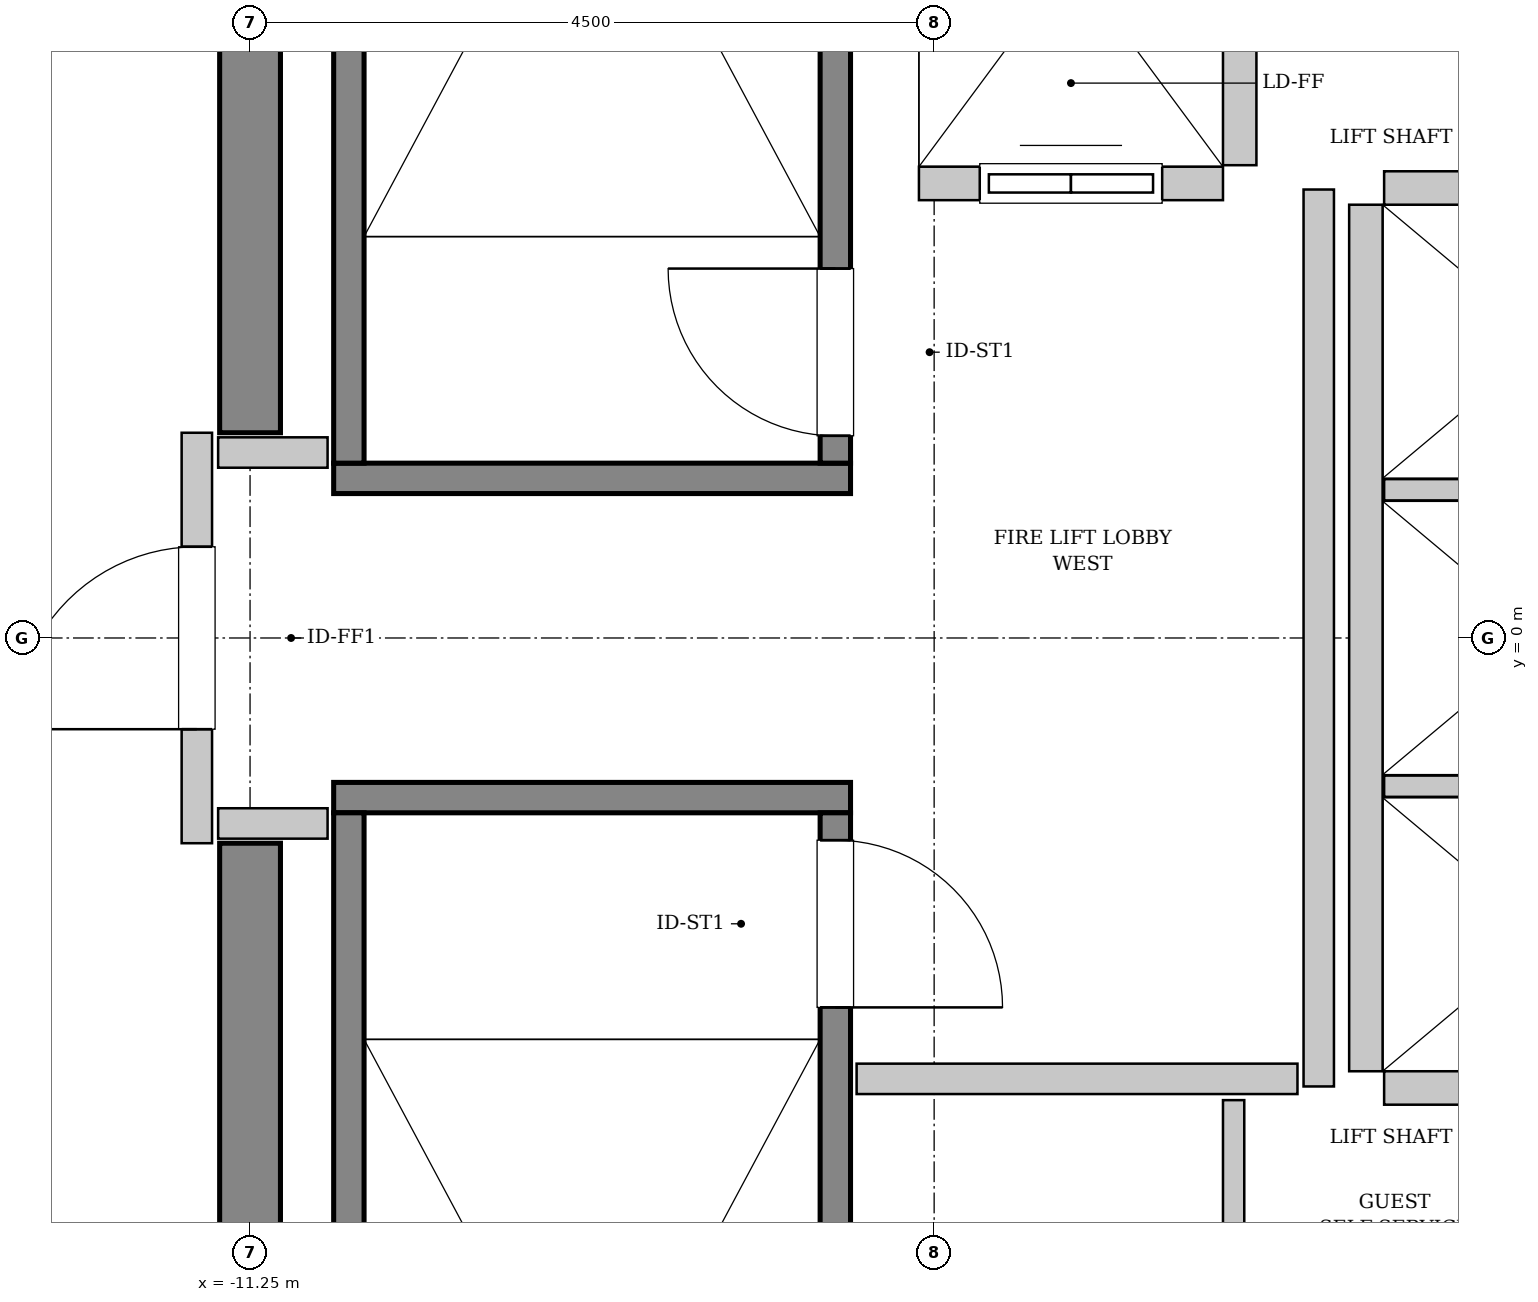
"""IFC4 building model, lengths in metres.
Left out: names, types, materials, properties, quantities, classifications, styles, units other than length and angle.
Written with IfcOpenShell. Run it as: python <this file> out.ifc"""

import sys

from ifc_helpers import new_model, si_unit, direction, frame, frame_2d, origin, place, context, subcontext, project, spatial, rectangle, extrude, source, transform, mapped, element, fill, save


model = new_model("IFC4")
c1 = context("Model", 3, precision=1e-05, world=origin(), true_north=direction((0.0, 1.0)))
c2 = subcontext(c1, "Body", "Model", "MODEL_VIEW")
j1 = project(units=[si_unit("LENGTHUNIT", "METRE"), si_unit("PLANEANGLEUNIT", "RADIAN")], contexts=[c1])
p1 = place(None, origin())
s1 = spatial("IfcSite", under=j1, at=p1, CompositionType="ELEMENT")
p2 = place(p1, origin())
s2 = spatial("IfcBuilding", under=s1, at=p2, CompositionType="ELEMENT")
p3 = place(p2, frame((0.0, 0.0, 349.0)))
s3 = spatial("IfcBuildingStorey", under=s2, at=p3, CompositionType="ELEMENT", Elevation=349.0)
m1 = source(origin(), c2, "Body", "SweptSolid", [
    extrude(rectangle(XDim=7.45, YDim=0.4, at=frame_2d((3.725, 0.0))), origin(), (0.0, 0.0, 1.0), 4.8),
])
for number, where, z_axis, x_axis in (
    (1, (-11.25, -8.8, 0.0), (0.0, 0.0, 1.0), (0.0, 1.0, 0.0)),
    (2, (-11.25, 1.35, 0.0), (0.0, 0.0, 1.0), (0.0, 1.0, 0.0)),
):
    element("IfcWall", number, at=place(p3, frame(where, z_axis=z_axis, x_axis=x_axis)), inside=s3, PredefinedType="SHEAR", context=c2, shape_type="MappedRepresentation", body=[
        mapped(m1, transform((0.0, 0.0, 0.0), x_axis=(1.0, 0.0, 0.0), y_axis=(0.0, 1.0, 0.0), z_axis=(0.0, 0.0, 1.0), scale=1.0)),
    ])
m2 = source(origin(), c2, "Body", "SweptSolid", [
    extrude(rectangle(XDim=3.4, YDim=0.2, at=frame_2d((1.7, 0.0))), origin(), (0.0, 0.0, 1.0), 4.8),
])
p4 = place(p3, frame((-7.3, 1.05, 0.0), z_axis=(0.0, 0.0, 1.0), x_axis=(-1.0, 0.0, 0.0)))
e3 = element("IfcWall", 3, at=p4, inside=s3, PredefinedType="SOLIDWALL", context=c2, shape_type="MappedRepresentation", body=[
    mapped(m2, transform((0.0, 0.0, 0.0), x_axis=(1.0, 0.0, 0.0), y_axis=(0.0, 1.0, 0.0), z_axis=(0.0, 0.0, 1.0), scale=1.0)),
])
m3 = source(origin(), c2, "Body", "SweptSolid", [
    extrude(rectangle(XDim=7.1, YDim=0.2, at=frame_2d((3.55, 0.0))), origin(), (0.0, 0.0, 1.0), 4.8),
])
p5 = place(p3, frame((-7.4, 1.15, 0.0), z_axis=(0.0, 0.0, 1.0), x_axis=(0.0, 1.0, 0.0)))
e4 = element("IfcWall", 4, at=p5, inside=s3, PredefinedType="SOLIDWALL", context=c2, shape_type="MappedRepresentation", body=[
    mapped(m3, transform((0.0, 0.0, 0.0), x_axis=(1.0, 0.0, 0.0), y_axis=(0.0, 1.0, 0.0), z_axis=(0.0, 0.0, 1.0), scale=1.0)),
])
p6 = place(p5, frame((0.18, 0.0, 0.0)))
e5 = element("IfcOpeningElement", 5, at=p6, cuts=e4, PredefinedType="OPENING", context=c2, shape_type="SweptSolid", body=[
    extrude(rectangle(XDim=1.1, YDim=2.15, at=frame_2d((0.55, 1.075))), frame((0.0, 0.11, 0.0), z_axis=(0.0, -1.0, 0.0), x_axis=(1.0, 0.0, 0.0)), (0.0, 0.0, 1.0), 0.22),
])
p7 = place(p3, frame((-10.6, 1.15, 0.0), z_axis=(0.0, 0.0, 1.0), x_axis=(0.0, 1.0, 0.0)))
e6 = element("IfcWall", 6, at=p7, inside=s3, PredefinedType="SOLIDWALL", context=c2, shape_type="MappedRepresentation", body=[
    mapped(m3, transform((0.0, 0.0, 0.0), x_axis=(1.0, 0.0, 0.0), y_axis=(0.0, 1.0, 0.0), z_axis=(0.0, 0.0, 1.0), scale=1.0)),
])
p8 = place(p3, frame((-10.7, -1.05, 0.0), z_axis=(0.0, 0.0, 1.0), x_axis=(1.0, 0.0, 0.0)))
e7 = element("IfcWall", 7, at=p8, inside=s3, PredefinedType="SOLIDWALL", context=c2, shape_type="MappedRepresentation", body=[
    mapped(m2, transform((0.0, 0.0, 0.0), x_axis=(1.0, 0.0, 0.0), y_axis=(0.0, 1.0, 0.0), z_axis=(0.0, 0.0, 1.0), scale=1.0)),
])
p9 = place(p3, frame((-10.6, -1.15, 0.0), z_axis=(0.0, 0.0, 1.0), x_axis=(0.0, -1.0, 0.0)))
e8 = element("IfcWall", 8, at=p9, inside=s3, PredefinedType="SOLIDWALL", context=c2, shape_type="MappedRepresentation", body=[
    mapped(m3, transform((0.0, 0.0, 0.0), x_axis=(1.0, 0.0, 0.0), y_axis=(0.0, 1.0, 0.0), z_axis=(0.0, 0.0, 1.0), scale=1.0)),
])
p10 = place(p3, frame((-7.4, -1.15, 0.0), z_axis=(0.0, 0.0, 1.0), x_axis=(0.0, -1.0, 0.0)))
e9 = element("IfcWall", 9, at=p10, inside=s3, PredefinedType="SOLIDWALL", context=c2, shape_type="MappedRepresentation", body=[
    mapped(m3, transform((0.0, 0.0, 0.0), x_axis=(1.0, 0.0, 0.0), y_axis=(0.0, 1.0, 0.0), z_axis=(0.0, 0.0, 1.0), scale=1.0)),
])
p11 = place(p10, frame((0.18, 0.0, 0.0)))
e10 = element("IfcOpeningElement", 10, at=p11, cuts=e9, PredefinedType="OPENING", context=c2, shape_type="SweptSolid", body=[
    extrude(rectangle(XDim=1.1, YDim=2.15, at=frame_2d((0.55, 1.075))), frame((0.0, 0.11, 0.0), z_axis=(0.0, -1.0, 0.0), x_axis=(1.0, 0.0, 0.0)), (0.0, 0.0, 1.0), 0.22),
])
m4 = source(origin(), c2, "Body", "SweptSolid", [
    extrude(rectangle(XDim=2.0, YDim=0.22, at=frame_2d((1.0, 0.0))), origin(), (0.0, 0.0, 1.0), 4.485),
])
p12 = place(p3, frame((-6.85, 2.99, 0.0), z_axis=(0.0, 0.0, 1.0), x_axis=(1.0, 0.0, 0.0)))
e11 = element("IfcWall", 11, at=p12, inside=s3, PredefinedType="SOLIDWALL", context=c2, shape_type="MappedRepresentation", body=[
    mapped(m4, transform((0.0, 0.0, 0.0), x_axis=(1.0, 0.0, 0.0), y_axis=(0.0, 1.0, 0.0), z_axis=(0.0, 0.0, 1.0), scale=1.0)),
])
p13 = place(p12, frame((0.4, 0.0, 0.0)))
e12 = element("IfcOpeningElement", 12, at=p13, cuts=e11, PredefinedType="OPENING", context=c2, shape_type="SweptSolid", body=[
    extrude(rectangle(XDim=1.2, YDim=2.2, at=frame_2d((0.6, 1.1))), frame((0.0, 0.12, 0.0), z_axis=(0.0, -1.0, 0.0), x_axis=(1.0, 0.0, 0.0)), (0.0, 0.0, 1.0), 0.24),
])
m5 = source(origin(), c2, "Body", "SweptSolid", [
    extrude(rectangle(XDim=2.68, YDim=0.22, at=frame_2d((1.34, 0.0))), origin(), (0.0, 0.0, 1.0), 4.485),
])
p14 = place(p3, frame((-4.74, 3.11, 0.0), z_axis=(0.0, 0.0, 1.0), x_axis=(0.0, 1.0, 0.0)))
e13 = element("IfcWall", 13, at=p14, inside=s3, PredefinedType="SOLIDWALL", context=c2, shape_type="MappedRepresentation", body=[
    mapped(m5, transform((0.0, 0.0, 0.0), x_axis=(1.0, 0.0, 0.0), y_axis=(0.0, 1.0, 0.0), z_axis=(0.0, 0.0, 1.0), scale=1.0)),
])
m6 = source(origin(), c2, "Body", "SweptSolid", [
    extrude(rectangle(XDim=5.7, YDim=0.22, at=frame_2d((2.85, 0.0))), origin(), (0.0, 0.0, 1.0), 4.485),
])
p15 = place(p3, frame((-3.91, 2.85, 0.0), z_axis=(0.0, 0.0, 1.0), x_axis=(0.0, -1.0, 0.0)))
e14 = element("IfcWall", 14, at=p15, inside=s3, PredefinedType="SOLIDWALL", context=c2, shape_type="MappedRepresentation", body=[
    mapped(m6, transform((0.0, 0.0, 0.0), x_axis=(1.0, 0.0, 0.0), y_axis=(0.0, 1.0, 0.0), z_axis=(0.0, 0.0, 1.0), scale=1.0)),
])
m7 = source(origin(), c2, "Body", "SweptSolid", [
    extrude(rectangle(XDim=2.13, YDim=0.22, at=frame_2d((1.065, 0.0))), origin(), (0.0, 0.0, 1.0), 4.485),
])
p16 = place(p3, frame((-3.79, -2.96, 0.0), z_axis=(0.0, 0.0, 1.0), x_axis=(1.0, 0.0, 0.0)))
e15 = element("IfcWall", 15, at=p16, inside=s3, PredefinedType="SOLIDWALL", context=c2, shape_type="MappedRepresentation", body=[
    mapped(m7, transform((0.0, 0.0, 0.0), x_axis=(1.0, 0.0, 0.0), y_axis=(0.0, 1.0, 0.0), z_axis=(0.0, 0.0, 1.0), scale=1.0)),
])
m8 = source(origin(), c2, "Body", "SweptSolid", [
    extrude(rectangle(XDim=2.13, YDim=0.14, at=frame_2d((1.065, 0.0))), origin(), (0.0, 0.0, 1.0), 4.485),
])
for number, where, z_axis, x_axis in (
    (16, (-3.79, -0.975, 0.0), (0.0, 0.0, 1.0), (1.0, 0.0, 0.0)),
    (17, (-3.79, 0.975, 0.0), (0.0, 0.0, 1.0), (1.0, 0.0, 0.0)),
):
    element("IfcWall", number, at=place(p3, frame(where, z_axis=z_axis, x_axis=x_axis)), inside=s3, PredefinedType="PARTITIONING", context=c2, shape_type="MappedRepresentation", body=[
        mapped(m8, transform((0.0, 0.0, 0.0), x_axis=(1.0, 0.0, 0.0), y_axis=(0.0, 1.0, 0.0), z_axis=(0.0, 0.0, 1.0), scale=1.0)),
    ])
p17 = place(p3, frame((-1.66, 2.96, 0.0), z_axis=(0.0, 0.0, 1.0), x_axis=(-1.0, 0.0, 0.0)))
e18 = element("IfcWall", 18, at=p17, inside=s3, PredefinedType="SOLIDWALL", context=c2, shape_type="MappedRepresentation", body=[
    mapped(m7, transform((0.0, 0.0, 0.0), x_axis=(1.0, 0.0, 0.0), y_axis=(0.0, 1.0, 0.0), z_axis=(0.0, 0.0, 1.0), scale=1.0)),
])
m9 = source(origin(), c2, "Body", "SweptSolid", [
    extrude(rectangle(XDim=2.7, YDim=0.2, at=frame_2d((1.35, 0.0))), origin(), (0.0, 0.0, 1.0), 3.575),
])
p18 = place(p3, frame((-11.6, -1.35, 0.0), z_axis=(0.0, 0.0, 1.0), x_axis=(0.0, 1.0, 0.0)))
e19 = element("IfcWall", 19, at=p18, inside=s3, PredefinedType="PARTITIONING", context=c2, shape_type="MappedRepresentation", body=[
    mapped(m9, transform((0.0, 0.0, 0.0), x_axis=(1.0, 0.0, 0.0), y_axis=(0.0, 1.0, 0.0), z_axis=(0.0, 0.0, 1.0), scale=1.0)),
])
p19 = place(p18, frame((0.75, 0.0, 0.0)))
e20 = element("IfcOpeningElement", 20, at=p19, cuts=e19, PredefinedType="OPENING", context=c2, shape_type="SweptSolid", body=[
    extrude(rectangle(XDim=1.2, YDim=2.15, at=frame_2d((0.6, 1.075))), frame((0.0, 0.11, 0.0), z_axis=(0.0, -1.0, 0.0), x_axis=(1.0, 0.0, 0.0)), (0.0, 0.0, 1.0), 0.22),
])
m10 = source(origin(), c2, "Body", "SweptSolid", [
    extrude(rectangle(XDim=5.9, YDim=0.2, at=frame_2d((2.95, 0.0))), origin(), (0.0, 0.0, 1.0), 4.485),
])
p20 = place(p3, frame((-4.22, -2.95, 0.0), z_axis=(0.0, 0.0, 1.0), x_axis=(0.0, 1.0, 0.0)))
e21 = element("IfcWall", 21, at=p20, inside=s3, PredefinedType="PARTITIONING", context=c2, shape_type="MappedRepresentation", body=[
    mapped(m10, transform((0.0, 0.0, 0.0), x_axis=(1.0, 0.0, 0.0), y_axis=(0.0, 1.0, 0.0), z_axis=(0.0, 0.0, 1.0), scale=1.0)),
])
m11 = source(origin(), c2, "Body", "SweptSolid", [
    extrude(rectangle(XDim=2.9, YDim=0.2, at=frame_2d((1.45, 0.0))), origin(), (0.0, 0.0, 1.0), 4.485),
])
p21 = place(p3, frame((-7.26, -2.9, 0.0), z_axis=(0.0, 0.0, 1.0), x_axis=(1.0, 0.0, 0.0)))
e22 = element("IfcWall", 22, at=p21, inside=s3, PredefinedType="PARTITIONING", context=c2, shape_type="MappedRepresentation", body=[
    mapped(m11, transform((0.0, 0.0, 0.0), x_axis=(1.0, 0.0, 0.0), y_axis=(0.0, 1.0, 0.0), z_axis=(0.0, 0.0, 1.0), scale=1.0)),
])
m12 = source(origin(), c2, "Body", "SweptSolid", [
    extrude(rectangle(XDim=0.72, YDim=0.2, at=frame_2d((0.36, 0.0))), origin(), (0.0, 0.0, 1.0), 4.485),
])
for number, where, z_axis, x_axis in (
    (23, (-11.46, 1.22, 0.0), (0.0, 0.0, 1.0), (1.0, 0.0, 0.0)),
    (24, (-11.46, -1.22, 0.0), (0.0, 0.0, 1.0), (1.0, 0.0, 0.0)),
):
    element("IfcWall", number, at=place(p3, frame(where, z_axis=z_axis, x_axis=x_axis)), inside=s3, PredefinedType="PARTITIONING", context=c2, shape_type="MappedRepresentation", body=[
        mapped(m12, transform((0.0, 0.0, 0.0), x_axis=(1.0, 0.0, 0.0), y_axis=(0.0, 1.0, 0.0), z_axis=(0.0, 0.0, 1.0), scale=1.0)),
    ])
m13 = source(origin(), c2, "Body", "SweptSolid", [
    extrude(rectangle(XDim=1.6, YDim=0.14, at=frame_2d((0.8, 0.0))), origin(), (0.0, 0.0, 1.0), 4.485),
])
p22 = place(p3, frame((-4.78, -4.64, 0.0), z_axis=(0.0, 0.0, 1.0), x_axis=(0.0, 1.0, 0.0)))
e25 = element("IfcWall", 25, at=p22, inside=s3, PredefinedType="PARTITIONING", context=c2, shape_type="MappedRepresentation", body=[
    mapped(m13, transform((0.0, 0.0, 0.0), x_axis=(1.0, 0.0, 0.0), y_axis=(0.0, 1.0, 0.0), z_axis=(0.0, 0.0, 1.0), scale=1.0)),
])
m14 = source(origin(), c2, "Body", "SweptSolid", [
    extrude(rectangle(XDim=1.1, YDim=2.15, at=frame_2d((0.55, 1.075))), frame((0.0, 0.025, 0.0), z_axis=(0.0, -1.0, 0.0), x_axis=(1.0, 0.0, 0.0)), (0.0, 0.0, 1.0), 0.05),
])
p23 = place(p6, origin())
e26 = element("IfcDoor", 26, at=p23, inside=s3, OperationType="SINGLE_SWING_RIGHT", PredefinedType="DOOR", context=c2, shape_type="MappedRepresentation", body=[
    mapped(m14, transform((0.0, 0.0, 0.0), x_axis=(1.0, 0.0, 0.0), y_axis=(0.0, 1.0, 0.0), z_axis=(0.0, 0.0, 1.0), scale=1.0)),
])
fill(e5, e26)
p24 = place(p11, origin())
e27 = element("IfcDoor", 27, at=p24, inside=s3, OperationType="SINGLE_SWING_RIGHT", PredefinedType="DOOR", context=c2, shape_type="MappedRepresentation", body=[
    mapped(m14, transform((0.0, 0.0, 0.0), x_axis=(1.0, 0.0, 0.0), y_axis=(0.0, 1.0, 0.0), z_axis=(0.0, 0.0, 1.0), scale=1.0)),
])
fill(e10, e27)
m15 = source(origin(), c2, "Body", "SweptSolid", [
    extrude(rectangle(XDim=1.2, YDim=2.2, at=frame_2d((0.6, 1.1))), frame((0.0, 0.025, 0.0), z_axis=(0.0, -1.0, 0.0), x_axis=(1.0, 0.0, 0.0)), (0.0, 0.0, 1.0), 0.05),
])
p25 = place(p13, origin())
e28 = element("IfcDoor", 28, at=p25, inside=s3, OperationType="SLIDING_TO_LEFT", PredefinedType="DOOR", context=c2, shape_type="MappedRepresentation", body=[
    mapped(m15, transform((0.0, 0.0, 0.0), x_axis=(1.0, 0.0, 0.0), y_axis=(0.0, 1.0, 0.0), z_axis=(0.0, 0.0, 1.0), scale=1.0)),
])
fill(e12, e28)
m16 = source(origin(), c2, "Body", "SweptSolid", [
    extrude(rectangle(XDim=1.2, YDim=2.15, at=frame_2d((0.6, 1.075))), frame((0.0, 0.025, 0.0), z_axis=(0.0, -1.0, 0.0), x_axis=(1.0, 0.0, 0.0)), (0.0, 0.0, 1.0), 0.05),
])
p26 = place(p19, origin())
e29 = element("IfcDoor", 29, at=p26, inside=s3, OperationType="SINGLE_SWING_LEFT", PredefinedType="DOOR", context=c2, shape_type="MappedRepresentation", body=[
    mapped(m16, transform((0.0, 0.0, 0.0), x_axis=(1.0, 0.0, 0.0), y_axis=(0.0, 1.0, 0.0), z_axis=(0.0, 0.0, 1.0), scale=1.0)),
])
fill(e20, e29)
save(model, sys.argv[1])
